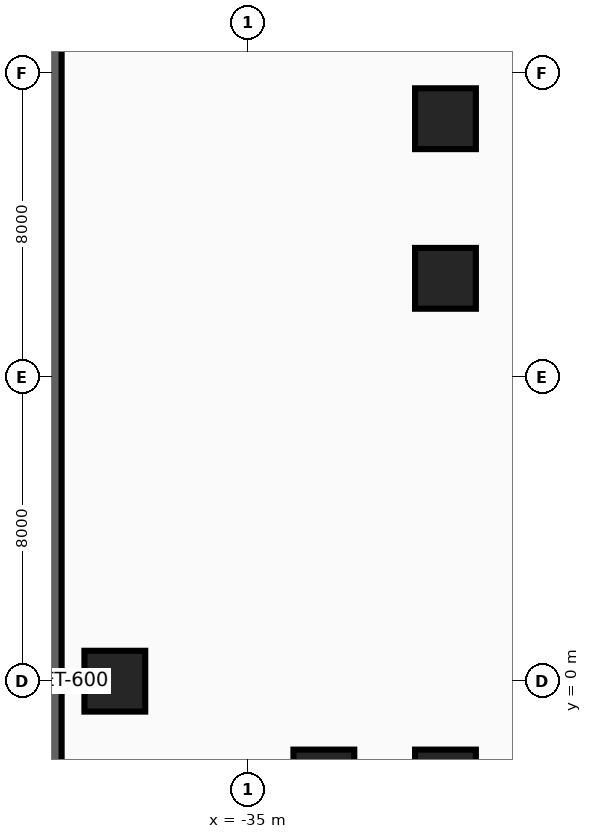
"""IFC4 building model, lengths in metres.
Left out: names, types, materials, properties, quantities, classifications, styles, units other than length and angle.
Written with IfcOpenShell. Run it as: python <this file> out.ifc"""

import sys

from ifc_helpers import new_model, si_unit, direction, frame, frame_2d, origin, origin_2d, place, context, subcontext, project, spatial, rectangle, extrude, source, transform, mapped, element, save


model = new_model("IFC4")
c1 = context("Model", 3, precision=1e-05, world=origin(), true_north=direction((0.0, 1.0)))
c2 = subcontext(c1, "Body", "Model", "MODEL_VIEW")
j1 = project(units=[si_unit("LENGTHUNIT", "METRE"), si_unit("PLANEANGLEUNIT", "RADIAN")], contexts=[c1])
p1 = place(None, origin())
s1 = spatial("IfcSite", under=j1, at=p1, CompositionType="ELEMENT")
p2 = place(p1, origin())
s2 = spatial("IfcBuilding", under=s1, at=p2, CompositionType="ELEMENT")
p3 = place(p2, frame((0.0, 0.0, -4.8)))
s3 = spatial("IfcBuildingStorey", under=s2, at=p3, CompositionType="ELEMENT", Elevation=-4.8)
p4 = place(p3, frame((-40.2, -27.9, 0.0), z_axis=(0.0, 0.0, 1.0), x_axis=(0.0, 1.0, 0.0)))
e1 = element("IfcWall", 1, at=p4, inside=s3, PredefinedType="SOLIDWALL", context=c2, shape_type="SweptSolid", body=[
    extrude(rectangle(XDim=55.8, YDim=0.6, at=frame_2d((27.9, 0.0))), origin(), (0.0, 0.0, 1.0), 4.52),
])
m1 = source(origin(), c2, "Body", "SweptSolid", [
    extrude(rectangle(XDim=1.6, YDim=1.6, at=origin_2d()), origin(), (0.0, 0.0, 1.0), 4.8),
])
for number, where, z_axis, x_axis in (
    (2, (-29.8, -2.6, 0.0), (0.0, 0.0, 1.0), (1.0, 0.0, 0.0)),
    (3, (-29.8, 10.6, 0.0), (0.0, 0.0, 1.0), (1.0, 0.0, 0.0)),
    (4, (-29.8, 14.8, 0.0), (0.0, 0.0, 1.0), (1.0, 0.0, 0.0)),
    (5, (-33.0, -2.6, 0.0), (0.0, 0.0, 1.0), (1.0, 0.0, 0.0)),
    (6, (-38.5, 0.0, 0.0), (0.0, 0.0, 1.0), (1.0, 0.0, 0.0)),
):
    element("IfcColumn", number, at=place(p3, frame(where, z_axis=z_axis, x_axis=x_axis)), inside=s3, PredefinedType="COLUMN", context=c2, shape_type="MappedRepresentation", body=[
        mapped(m1, transform((0.0, 0.0, 0.0), x_axis=(1.0, 0.0, 0.0), y_axis=(0.0, 1.0, 0.0), z_axis=(0.0, 0.0, 1.0), scale=1.0)),
    ])
save(model, sys.argv[1])
